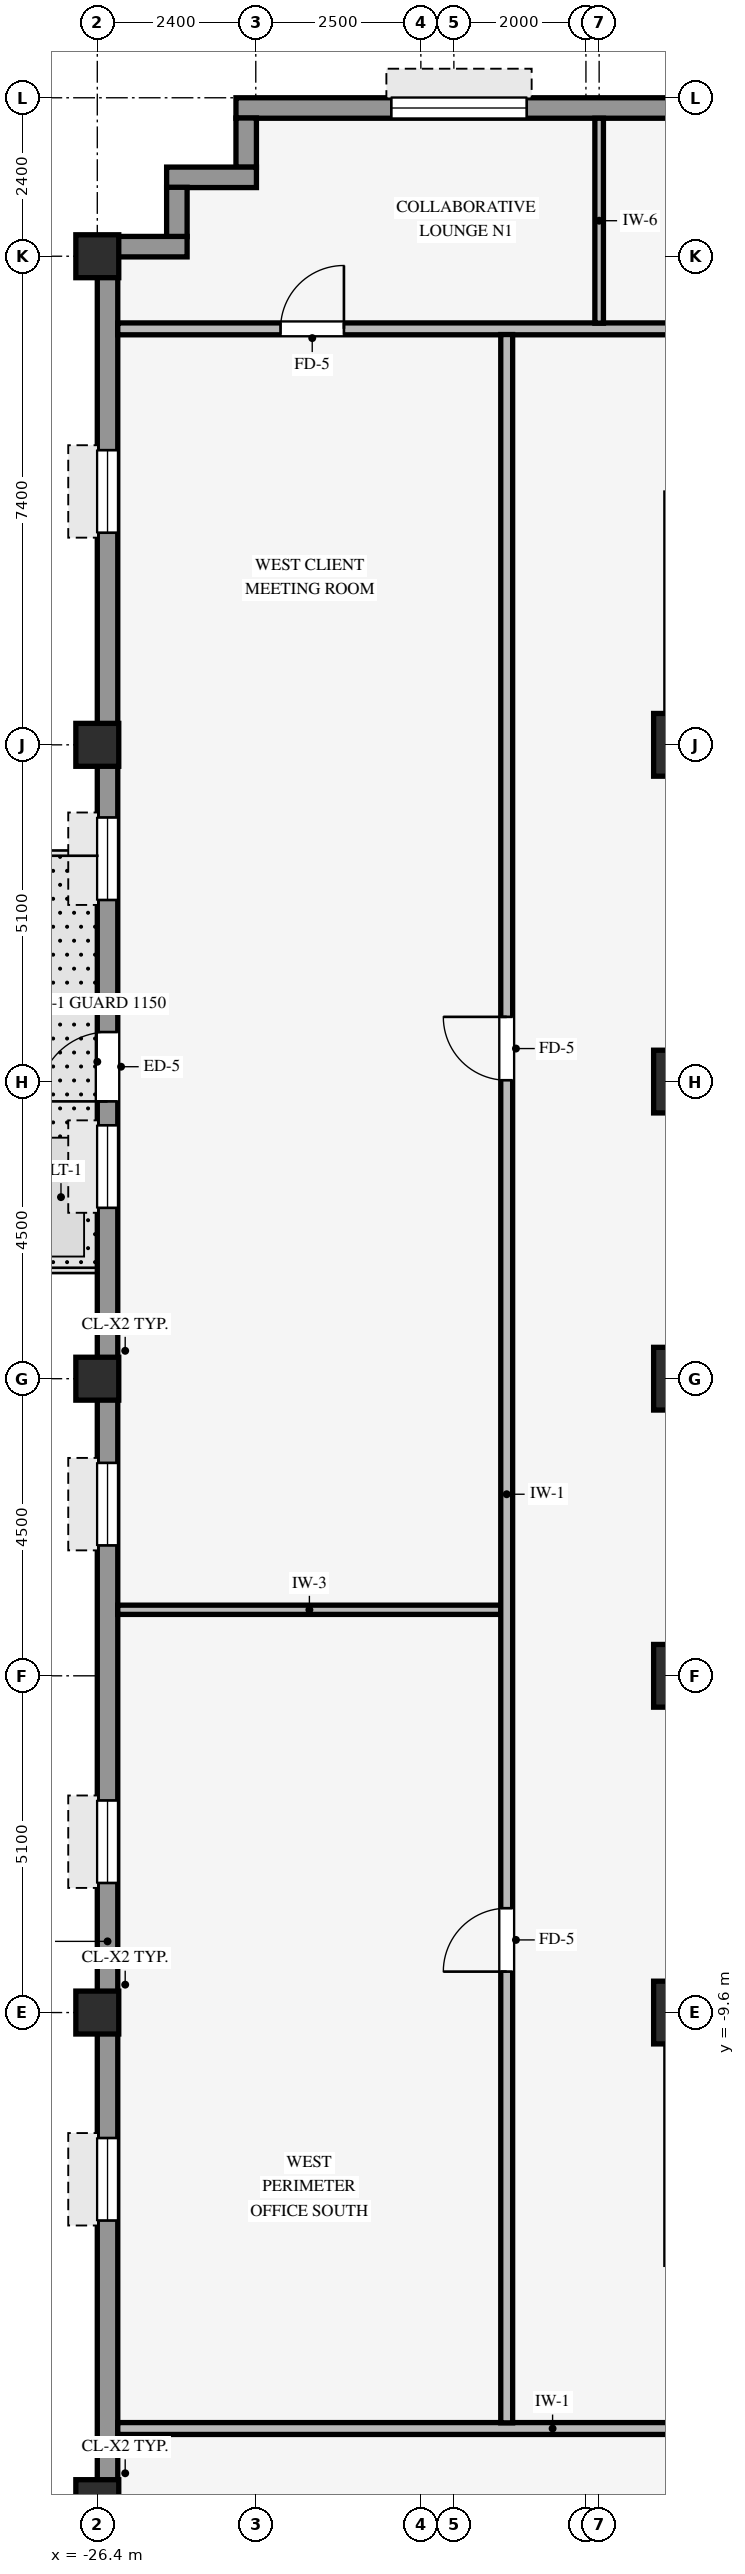
"""IFC4 building model, lengths in metres.
Left out: names, types, materials, properties, quantities, classifications, styles, units other than length and angle.
Written with IfcOpenShell. Run it as: python <this file> out.ifc"""

import sys

from ifc_helpers import new_model, si_unit, direction, frame, frame_2d, origin, origin_2d, place, context, subcontext, project, spatial, rectangle, hollow_rectangle, extrude, source, transform, mapped, element, fill, save


model = new_model("IFC4")
c1 = context("Model", 3, precision=1e-05, world=origin(), true_north=direction((0.0, 1.0)))
c2 = subcontext(c1, "Body", "Model", "MODEL_VIEW")
j1 = project(units=[si_unit("LENGTHUNIT", "METRE"), si_unit("PLANEANGLEUNIT", "RADIAN")], contexts=[c1])
p1 = place(None, origin())
s1 = spatial("IfcSite", under=j1, at=p1, CompositionType="ELEMENT")
p2 = place(p1, origin())
s2 = spatial("IfcBuilding", under=s1, at=p2, CompositionType="ELEMENT")
p3 = place(p2, frame((0.0, 0.0, 174.95)))
s3 = spatial("IfcBuildingStorey", under=s2, at=p3, CompositionType="ELEMENT", Elevation=174.95)
for number, where, z_axis, x_axis in (
    (1, (-17.5, -9.6, 0.0), (0.0, 0.0, 1.0), (1.0, 0.0, 0.0)),
    (2, (-17.5, -4.5, 0.0), (0.0, 0.0, 1.0), (1.0, 0.0, 0.0)),
    (3, (-17.5, 4.5, 0.0), (0.0, 0.0, 1.0), (1.0, 0.0, 0.0)),
    (4, (-17.5, 9.6, 0.0), (0.0, 0.0, 1.0), (1.0, 0.0, 0.0)),
    (5, (-17.5, 0.0, 0.0), (0.0, 0.0, 1.0), (1.0, 0.0, 0.0)),
):
    element("IfcColumn", number, at=place(p3, frame(where, z_axis=z_axis, x_axis=x_axis)), inside=s3, PredefinedType="COLUMN", context=c2, shape_type="SweptSolid", body=[
        extrude(rectangle(XDim=0.95, YDim=0.95, at=origin_2d()), origin(), (0.0, 0.0, 1.0), 3.37),
    ])
for number, where, z_axis, x_axis in (
    (6, (-26.4, -17.0, 0.0), (0.0, 0.0, 1.0), (1.0, 0.0, 0.0)),
    (7, (-26.4, -9.6, 0.0), (0.0, 0.0, 1.0), (1.0, 0.0, 0.0)),
    (8, (-26.4, 0.0, 0.0), (0.0, 0.0, 1.0), (1.0, 0.0, 0.0)),
    (9, (-26.4, 9.6, 0.0), (0.0, 0.0, 1.0), (1.0, 0.0, 0.0)),
    (10, (-26.4, 17.0, 0.0), (0.0, 0.0, 1.0), (1.0, 0.0, 0.0)),
):
    element("IfcColumn", number, at=place(p3, frame(where, z_axis=z_axis, x_axis=x_axis)), inside=s3, PredefinedType="COLUMN", context=c2, shape_type="SweptSolid", body=[
        extrude(hollow_rectangle(XDim=0.65, YDim=0.65, WallThickness=0.04, InnerFilletRadius=0.04, OuterFilletRadius=0.08, at=origin_2d()), origin(), (0.0, 0.0, 1.0), 3.37),
    ])
p4 = place(p3, frame((-24.3, 19.245, 0.0), z_axis=(0.0, 0.0, 1.0), x_axis=(1.0, 0.0, 0.0)))
e11 = element("IfcWall", 11, at=p4, inside=s3, PredefinedType="STANDARD", context=c2, shape_type="SweptSolid", body=[
    extrude(rectangle(XDim=44.8, YDim=0.31, at=frame_2d((22.4, 0.0))), origin(), (0.0, 0.0, 1.0), 2.705),
])
p5 = place(p4, frame((2.353, 0.0, 0.8)))
e12 = element("IfcOpeningElement", 12, at=p5, cuts=e11, PredefinedType="OPENING", context=c2, shape_type="SweptSolid", body=[
    extrude(rectangle(XDim=2.05, YDim=1.52, at=frame_2d((1.025, 0.76))), frame((0.0, 0.165, 0.0), z_axis=(0.0, -1.0, 0.0), x_axis=(1.0, 0.0, 0.0)), (0.0, 0.0, 1.0), 0.33),
])
p6 = place(p4, frame((7.108, 0.0, 0.8)))
e13 = element("IfcOpeningElement", 13, at=p6, cuts=e11, PredefinedType="OPENING", context=c2, shape_type="SweptSolid", body=[
    extrude(rectangle(XDim=2.05, YDim=1.52, at=frame_2d((1.025, 0.76))), frame((0.0, 0.165, 0.0), z_axis=(0.0, -1.0, 0.0), x_axis=(1.0, 0.0, 0.0)), (0.0, 0.0, 1.0), 0.33),
])
p7 = place(p4, frame((11.414, 0.0, 0.8)))
e14 = element("IfcOpeningElement", 14, at=p7, cuts=e11, PredefinedType="OPENING", context=c2, shape_type="SweptSolid", body=[
    extrude(rectangle(XDim=2.05, YDim=1.52, at=frame_2d((1.025, 0.76))), frame((0.0, 0.165, 0.0), z_axis=(0.0, -1.0, 0.0), x_axis=(1.0, 0.0, 0.0)), (0.0, 0.0, 1.0), 0.33),
])
p8 = place(p4, frame((16.619, 0.0, 0.8)))
e15 = element("IfcOpeningElement", 15, at=p8, cuts=e11, PredefinedType="OPENING", context=c2, shape_type="SweptSolid", body=[
    extrude(rectangle(XDim=2.05, YDim=1.52, at=frame_2d((1.025, 0.76))), frame((0.0, 0.165, 0.0), z_axis=(0.0, -1.0, 0.0), x_axis=(1.0, 0.0, 0.0)), (0.0, 0.0, 1.0), 0.33),
])
p9 = place(p4, frame((20.925, 0.0, 0.8)))
e16 = element("IfcOpeningElement", 16, at=p9, cuts=e11, PredefinedType="OPENING", context=c2, shape_type="SweptSolid", body=[
    extrude(rectangle(XDim=2.05, YDim=1.52, at=frame_2d((1.025, 0.76))), frame((0.0, 0.165, 0.0), z_axis=(0.0, -1.0, 0.0), x_axis=(1.0, 0.0, 0.0)), (0.0, 0.0, 1.0), 0.33),
])
p10 = place(p4, frame((26.131, 0.0, 0.8)))
e17 = element("IfcOpeningElement", 17, at=p10, cuts=e11, PredefinedType="OPENING", context=c2, shape_type="SweptSolid", body=[
    extrude(rectangle(XDim=2.05, YDim=1.52, at=frame_2d((1.025, 0.76))), frame((0.0, 0.165, 0.0), z_axis=(0.0, -1.0, 0.0), x_axis=(1.0, 0.0, 0.0)), (0.0, 0.0, 1.0), 0.33),
])
p11 = place(p4, frame((29.986, 0.0, 0.8)))
e18 = element("IfcOpeningElement", 18, at=p11, cuts=e11, PredefinedType="OPENING", context=c2, shape_type="SweptSolid", body=[
    extrude(rectangle(XDim=2.05, YDim=1.52, at=frame_2d((1.025, 0.76))), frame((0.0, 0.165, 0.0), z_axis=(0.0, -1.0, 0.0), x_axis=(1.0, 0.0, 0.0)), (0.0, 0.0, 1.0), 0.33),
])
p12 = place(p4, frame((35.642, 0.0, 0.8)))
e19 = element("IfcOpeningElement", 19, at=p12, cuts=e11, PredefinedType="OPENING", context=c2, shape_type="SweptSolid", body=[
    extrude(rectangle(XDim=2.05, YDim=1.52, at=frame_2d((1.025, 0.76))), frame((0.0, 0.165, 0.0), z_axis=(0.0, -1.0, 0.0), x_axis=(1.0, 0.0, 0.0)), (0.0, 0.0, 1.0), 0.33),
])
p13 = place(p4, frame((40.397, 0.0, 0.8)))
e20 = element("IfcOpeningElement", 20, at=p13, cuts=e11, PredefinedType="OPENING", context=c2, shape_type="SweptSolid", body=[
    extrude(rectangle(XDim=2.05, YDim=1.52, at=frame_2d((1.025, 0.76))), frame((0.0, 0.165, 0.0), z_axis=(0.0, -1.0, 0.0), x_axis=(1.0, 0.0, 0.0)), (0.0, 0.0, 1.0), 0.33),
])
p14 = place(p3, frame((-24.145, 18.346, 0.0), z_axis=(0.0, 0.0, 1.0), x_axis=(0.0, 1.0, 0.0)))
e21 = element("IfcWall", 21, at=p14, inside=s3, PredefinedType="STANDARD", context=c2, shape_type="SweptSolid", body=[
    extrude(rectangle(XDim=0.748, YDim=0.31, at=frame_2d((0.374, 0.0))), origin(), (0.0, 0.0, 1.0), 2.816),
])
p15 = place(p3, frame((-25.35, 18.195, 0.0), z_axis=(0.0, 0.0, 1.0), x_axis=(1.0, 0.0, 0.0)))
e22 = element("IfcWall", 22, at=p15, inside=s3, PredefinedType="STANDARD", context=c2, shape_type="SweptSolid", body=[
    extrude(rectangle(XDim=1.36, YDim=0.31, at=frame_2d((0.68, 0.0))), origin(), (0.0, 0.0, 1.0), 2.816),
])
p16 = place(p3, frame((-25.195, 17.296, 0.0), z_axis=(0.0, 0.0, 1.0), x_axis=(0.0, 1.0, 0.0)))
e23 = element("IfcWall", 23, at=p16, inside=s3, PredefinedType="STANDARD", context=c2, shape_type="SweptSolid", body=[
    extrude(rectangle(XDim=0.748, YDim=0.31, at=frame_2d((0.374, 0.0))), origin(), (0.0, 0.0, 1.0), 2.816),
])
p17 = place(p3, frame((-26.4, 17.145, 0.0), z_axis=(0.0, 0.0, 1.0), x_axis=(1.0, 0.0, 0.0)))
e24 = element("IfcWall", 24, at=p17, inside=s3, PredefinedType="STANDARD", context=c2, shape_type="SweptSolid", body=[
    extrude(rectangle(XDim=1.36, YDim=0.31, at=frame_2d((0.68, 0.0))), origin(), (0.0, 0.0, 1.0), 2.816),
])
p18 = place(p3, frame((-26.245, -20.794, 0.0), z_axis=(0.0, 0.0, 1.0), x_axis=(0.0, 1.0, 0.0)))
e25 = element("IfcWall", 25, at=p18, inside=s3, PredefinedType="STANDARD", context=c2, shape_type="SweptSolid", body=[
    extrude(rectangle(XDim=37.788, YDim=0.31, at=frame_2d((18.894, 0.0))), origin(), (0.0, 0.0, 1.0), 2.705),
])
p19 = place(p18, frame((24.994, 0.0, 0.0)))
e26 = element("IfcOpeningElement", 26, at=p19, cuts=e25, PredefinedType="OPENING", context=c2, shape_type="SweptSolid", body=[
    extrude(rectangle(XDim=1.05, YDim=2.1, at=frame_2d((0.525, 1.05))), frame((0.0, 0.165, 0.0), z_axis=(0.0, -1.0, 0.0), x_axis=(1.0, 0.0, 0.0)), (0.0, 0.0, 1.0), 0.33),
])
p20 = place(p18, frame((1.581, 0.0, 0.8)))
e27 = element("IfcOpeningElement", 27, at=p20, cuts=e25, PredefinedType="OPENING", context=c2, shape_type="SweptSolid", body=[
    extrude(rectangle(XDim=1.25, YDim=1.52, at=frame_2d((0.625, 0.76))), frame((0.0, 0.165, 0.0), z_axis=(0.0, -1.0, 0.0), x_axis=(1.0, 0.0, 0.0)), (0.0, 0.0, 1.0), 0.33),
])
p21 = place(p18, frame((8.044, 0.0, 0.8)))
e28 = element("IfcOpeningElement", 28, at=p21, cuts=e25, PredefinedType="OPENING", context=c2, shape_type="SweptSolid", body=[
    extrude(rectangle(XDim=1.25, YDim=1.52, at=frame_2d((0.625, 0.76))), frame((0.0, 0.165, 0.0), z_axis=(0.0, -1.0, 0.0), x_axis=(1.0, 0.0, 0.0)), (0.0, 0.0, 1.0), 0.33),
])
p22 = place(p18, frame((13.156, 0.0, 0.8)))
e29 = element("IfcOpeningElement", 29, at=p22, cuts=e25, PredefinedType="OPENING", context=c2, shape_type="SweptSolid", body=[
    extrude(rectangle(XDim=1.25, YDim=1.52, at=frame_2d((0.625, 0.76))), frame((0.0, 0.165, 0.0), z_axis=(0.0, -1.0, 0.0), x_axis=(1.0, 0.0, 0.0)), (0.0, 0.0, 1.0), 0.33),
])
p23 = place(p18, frame((18.269, 0.0, 0.8)))
e30 = element("IfcOpeningElement", 30, at=p23, cuts=e25, PredefinedType="OPENING", context=c2, shape_type="SweptSolid", body=[
    extrude(rectangle(XDim=1.25, YDim=1.52, at=frame_2d((0.625, 0.76))), frame((0.0, 0.165, 0.0), z_axis=(0.0, -1.0, 0.0), x_axis=(1.0, 0.0, 0.0)), (0.0, 0.0, 1.0), 0.33),
])
p24 = place(p18, frame((23.382, 0.0, 0.8)))
e31 = element("IfcOpeningElement", 31, at=p24, cuts=e25, PredefinedType="OPENING", context=c2, shape_type="SweptSolid", body=[
    extrude(rectangle(XDim=1.25, YDim=1.52, at=frame_2d((0.625, 0.76))), frame((0.0, 0.165, 0.0), z_axis=(0.0, -1.0, 0.0), x_axis=(1.0, 0.0, 0.0)), (0.0, 0.0, 1.0), 0.33),
])
p25 = place(p18, frame((28.044, 0.0, 0.8)))
e32 = element("IfcOpeningElement", 32, at=p25, cuts=e25, PredefinedType="OPENING", context=c2, shape_type="SweptSolid", body=[
    extrude(rectangle(XDim=1.25, YDim=1.52, at=frame_2d((0.625, 0.76))), frame((0.0, 0.165, 0.0), z_axis=(0.0, -1.0, 0.0), x_axis=(1.0, 0.0, 0.0)), (0.0, 0.0, 1.0), 0.33),
])
p26 = place(p18, frame((33.607, 0.0, 0.8)))
e33 = element("IfcOpeningElement", 33, at=p26, cuts=e25, PredefinedType="OPENING", context=c2, shape_type="SweptSolid", body=[
    extrude(rectangle(XDim=1.25, YDim=1.52, at=frame_2d((0.625, 0.76))), frame((0.0, 0.165, 0.0), z_axis=(0.0, -1.0, 0.0), x_axis=(1.0, 0.0, 0.0)), (0.0, 0.0, 1.0), 0.33),
])
p27 = place(p3, frame((-26.09, -15.9, 0.0), z_axis=(0.0, 0.0, 1.0), x_axis=(1.0, 0.0, 0.0)))
e34 = element("IfcWall", 34, at=p27, inside=s3, PredefinedType="PARTITIONING", context=c2, shape_type="SweptSolid", body=[
    extrude(rectangle(XDim=48.38, YDim=0.18, at=frame_2d((24.19, 0.0))), origin(), (0.0, 0.0, 1.0), 3.36),
])
p28 = place(p27, frame((26.51, 0.0, 0.0)))
e35 = element("IfcOpeningElement", 35, at=p28, cuts=e34, PredefinedType="OPENING", context=c2, shape_type="SweptSolid", body=[
    extrude(rectangle(XDim=0.96, YDim=2.1, at=frame_2d((0.48, 1.05))), frame((0.0, 0.1, 0.0), z_axis=(0.0, -1.0, 0.0), x_axis=(1.0, 0.0, 0.0)), (0.0, 0.0, 1.0), 0.2),
])
p29 = place(p27, frame((40.51, 0.0, 0.0)))
e36 = element("IfcOpeningElement", 36, at=p29, cuts=e34, PredefinedType="OPENING", context=c2, shape_type="SweptSolid", body=[
    extrude(rectangle(XDim=0.96, YDim=2.1, at=frame_2d((0.48, 1.05))), frame((0.0, 0.1, 0.0), z_axis=(0.0, -1.0, 0.0), x_axis=(1.0, 0.0, 0.0)), (0.0, 0.0, 1.0), 0.2),
])
p30 = place(p27, frame((13.62, 0.0, 0.0)))
e37 = element("IfcOpeningElement", 37, at=p30, cuts=e34, PredefinedType="OPENING", context=c2, shape_type="SweptSolid", body=[
    extrude(rectangle(XDim=0.96, YDim=2.1, at=frame_2d((0.48, 1.05))), frame((0.0, 0.1, 0.0), z_axis=(0.0, -1.0, 0.0), x_axis=(1.0, 0.0, 0.0)), (0.0, 0.0, 1.0), 0.2),
])
p31 = place(p3, frame((-26.09, -3.5, 0.0), z_axis=(0.0, 0.0, 1.0), x_axis=(1.0, 0.0, 0.0)))
e38 = element("IfcWall", 38, at=p31, inside=s3, PredefinedType="PARTITIONING", context=c2, shape_type="SweptSolid", body=[
    extrude(rectangle(XDim=5.804, YDim=0.14, at=frame_2d((2.902, 0.0))), origin(), (0.0, 0.0, 1.0), 3.36),
])
p32 = place(p3, frame((-26.09, 15.9, 0.0), z_axis=(0.0, 0.0, 1.0), x_axis=(1.0, 0.0, 0.0)))
e39 = element("IfcWall", 39, at=p32, inside=s3, PredefinedType="PARTITIONING", context=c2, shape_type="SweptSolid", body=[
    extrude(rectangle(XDim=48.38, YDim=0.18, at=frame_2d((24.19, 0.0))), origin(), (0.0, 0.0, 1.0), 3.36),
])
p33 = place(p32, frame((40.51, 0.0, 0.0)))
e40 = element("IfcOpeningElement", 40, at=p33, cuts=e39, PredefinedType="OPENING", context=c2, shape_type="SweptSolid", body=[
    extrude(rectangle(XDim=0.96, YDim=2.1, at=frame_2d((0.48, 1.05))), frame((0.0, 0.1, 0.0), z_axis=(0.0, -1.0, 0.0), x_axis=(1.0, 0.0, 0.0)), (0.0, 0.0, 1.0), 0.2),
])
p34 = place(p32, frame((19.995, 0.0, 0.0)))
e41 = element("IfcOpeningElement", 41, at=p34, cuts=e39, PredefinedType="OPENING", context=c2, shape_type="SweptSolid", body=[
    extrude(rectangle(XDim=0.96, YDim=2.1, at=frame_2d((0.48, 1.05))), frame((0.0, 0.1, 0.0), z_axis=(0.0, -1.0, 0.0), x_axis=(1.0, 0.0, 0.0)), (0.0, 0.0, 1.0), 0.2),
])
p35 = place(p32, frame((28.45, 0.0, 0.0)))
e42 = element("IfcOpeningElement", 42, at=p35, cuts=e39, PredefinedType="OPENING", context=c2, shape_type="SweptSolid", body=[
    extrude(rectangle(XDim=0.96, YDim=2.1, at=frame_2d((0.48, 1.05))), frame((0.0, 0.1, 0.0), z_axis=(0.0, -1.0, 0.0), x_axis=(1.0, 0.0, 0.0)), (0.0, 0.0, 1.0), 0.2),
])
p36 = place(p32, frame((11.605, 0.0, 0.0)))
e43 = element("IfcOpeningElement", 43, at=p36, cuts=e39, PredefinedType="OPENING", context=c2, shape_type="SweptSolid", body=[
    extrude(rectangle(XDim=0.96, YDim=2.1, at=frame_2d((0.48, 1.05))), frame((0.0, 0.1, 0.0), z_axis=(0.0, -1.0, 0.0), x_axis=(1.0, 0.0, 0.0)), (0.0, 0.0, 1.0), 0.2),
])
p37 = place(p32, frame((2.465, 0.0, 0.0)))
e44 = element("IfcOpeningElement", 44, at=p37, cuts=e39, PredefinedType="OPENING", context=c2, shape_type="SweptSolid", body=[
    extrude(rectangle(XDim=0.96, YDim=2.1, at=frame_2d((0.48, 1.05))), frame((0.0, 0.1, 0.0), z_axis=(0.0, -1.0, 0.0), x_axis=(1.0, 0.0, 0.0)), (0.0, 0.0, 1.0), 0.2),
])
p38 = place(p3, frame((-20.2, -15.814, 0.0), z_axis=(0.0, 0.0, 1.0), x_axis=(0.0, 1.0, 0.0)))
e45 = element("IfcWall", 45, at=p38, inside=s3, PredefinedType="PARTITIONING", context=c2, shape_type="SweptSolid", body=[
    extrude(rectangle(XDim=31.628, YDim=0.18, at=frame_2d((15.814, 0.0))), origin(), (0.0, 0.0, 1.0), 3.36),
])
p39 = place(p38, frame((20.334, 0.0, 0.0)))
e46 = element("IfcOpeningElement", 46, at=p39, cuts=e45, PredefinedType="OPENING", context=c2, shape_type="SweptSolid", body=[
    extrude(rectangle(XDim=0.96, YDim=2.1, at=frame_2d((0.48, 1.05))), frame((0.0, 0.1, 0.0), z_axis=(0.0, -1.0, 0.0), x_axis=(1.0, 0.0, 0.0)), (0.0, 0.0, 1.0), 0.2),
])
p40 = place(p38, frame((6.834, 0.0, 0.0)))
e47 = element("IfcOpeningElement", 47, at=p40, cuts=e45, PredefinedType="OPENING", context=c2, shape_type="SweptSolid", body=[
    extrude(rectangle(XDim=0.96, YDim=2.1, at=frame_2d((0.48, 1.05))), frame((0.0, 0.1, 0.0), z_axis=(0.0, -1.0, 0.0), x_axis=(1.0, 0.0, 0.0)), (0.0, 0.0, 1.0), 0.2),
])
p41 = place(p3, frame((-18.8, 15.986, 0.0), z_axis=(0.0, 0.0, 1.0), x_axis=(0.0, 1.0, 0.0)))
e48 = element("IfcWall", 48, at=p41, inside=s3, PredefinedType="PARTITIONING", context=c2, shape_type="SweptSolid", body=[
    extrude(rectangle(XDim=3.104, YDim=0.13, at=frame_2d((1.552, 0.0))), origin(), (0.0, 0.0, 1.0), 3.36),
])
m1 = source(origin(), c2, "Body", "SweptSolid", [
    extrude(rectangle(XDim=2.05, YDim=1.52, at=frame_2d((1.025, 0.76))), frame((0.0, 0.03, 0.0), z_axis=(0.0, -1.0, 0.0), x_axis=(1.0, 0.0, 0.0)), (0.0, 0.0, 1.0), 0.06),
])
p42 = place(p5, origin())
e49 = element("IfcWindow", 49, at=p42, inside=s3, PartitioningType="SINGLE_PANEL", PredefinedType="WINDOW", context=c2, shape_type="MappedRepresentation", body=[
    mapped(m1, transform((0.0, 0.0, 0.0), scale=1.0)),
])
fill(e12, e49)
m2 = source(origin(), c2, "Body", "SweptSolid", [
    extrude(rectangle(XDim=1.05, YDim=2.1, at=frame_2d((0.525, 1.05))), frame((0.0, 0.025, 0.0), z_axis=(0.0, -1.0, 0.0), x_axis=(1.0, 0.0, 0.0)), (0.0, 0.0, 1.0), 0.05),
])
p43 = place(p19, origin())
e50 = element("IfcDoor", 50, at=p43, inside=s3, OperationType="SINGLE_SWING_LEFT", PredefinedType="DOOR", context=c2, shape_type="MappedRepresentation", body=[
    mapped(m2, transform((0.0, 0.0, 0.0), scale=1.0)),
])
fill(e26, e50)
m3 = source(origin(), c2, "Body", "SweptSolid", [
    extrude(rectangle(XDim=1.25, YDim=1.52, at=frame_2d((0.625, 0.76))), frame((0.0, 0.03, 0.0), z_axis=(0.0, -1.0, 0.0), x_axis=(1.0, 0.0, 0.0)), (0.0, 0.0, 1.0), 0.06),
])
p44 = place(p21, origin())
e51 = element("IfcWindow", 51, at=p44, inside=s3, PartitioningType="SINGLE_PANEL", PredefinedType="WINDOW", context=c2, shape_type="MappedRepresentation", body=[
    mapped(m3, transform((0.0, 0.0, 0.0), scale=1.0)),
])
fill(e28, e51)
p45 = place(p22, origin())
e52 = element("IfcWindow", 52, at=p45, inside=s3, PartitioningType="SINGLE_PANEL", PredefinedType="WINDOW", context=c2, shape_type="MappedRepresentation", body=[
    mapped(m3, transform((0.0, 0.0, 0.0), scale=1.0)),
])
fill(e29, e52)
p46 = place(p23, origin())
e53 = element("IfcWindow", 53, at=p46, inside=s3, PartitioningType="SINGLE_PANEL", PredefinedType="WINDOW", context=c2, shape_type="MappedRepresentation", body=[
    mapped(m3, transform((0.0, 0.0, 0.0), scale=1.0)),
])
fill(e30, e53)
p47 = place(p24, origin())
e54 = element("IfcWindow", 54, at=p47, inside=s3, PartitioningType="SINGLE_PANEL", PredefinedType="WINDOW", context=c2, shape_type="MappedRepresentation", body=[
    mapped(m3, transform((0.0, 0.0, 0.0), scale=1.0)),
])
fill(e31, e54)
p48 = place(p25, origin())
e55 = element("IfcWindow", 55, at=p48, inside=s3, PartitioningType="SINGLE_PANEL", PredefinedType="WINDOW", context=c2, shape_type="MappedRepresentation", body=[
    mapped(m3, transform((0.0, 0.0, 0.0), scale=1.0)),
])
fill(e32, e55)
p49 = place(p26, origin())
e56 = element("IfcWindow", 56, at=p49, inside=s3, PartitioningType="SINGLE_PANEL", PredefinedType="WINDOW", context=c2, shape_type="MappedRepresentation", body=[
    mapped(m3, transform((0.0, 0.0, 0.0), scale=1.0)),
])
fill(e33, e56)
m4 = source(origin(), c2, "Body", "SweptSolid", [
    extrude(rectangle(XDim=0.96, YDim=2.1, at=frame_2d((0.48, 1.05))), frame((0.0, 0.025, 0.0), z_axis=(0.0, -1.0, 0.0), x_axis=(1.0, 0.0, 0.0)), (0.0, 0.0, 1.0), 0.05),
])
p50 = place(p39, origin())
e57 = element("IfcDoor", 57, at=p50, inside=s3, OperationType="SINGLE_SWING_RIGHT", PredefinedType="DOOR", context=c2, shape_type="MappedRepresentation", body=[
    mapped(m4, transform((0.0, 0.0, 0.0), scale=1.0)),
])
fill(e46, e57)
p51 = place(p40, origin())
e58 = element("IfcDoor", 58, at=p51, inside=s3, OperationType="SINGLE_SWING_LEFT", PredefinedType="DOOR", context=c2, shape_type="MappedRepresentation", body=[
    mapped(m4, transform((0.0, 0.0, 0.0), scale=1.0)),
])
fill(e47, e58)
p52 = place(p37, origin())
e59 = element("IfcDoor", 59, at=p52, inside=s3, OperationType="SINGLE_SWING_RIGHT", PredefinedType="DOOR", context=c2, shape_type="MappedRepresentation", body=[
    mapped(m4, transform((0.0, 0.0, 0.0), scale=1.0)),
])
fill(e44, e59)
save(model, sys.argv[1])
